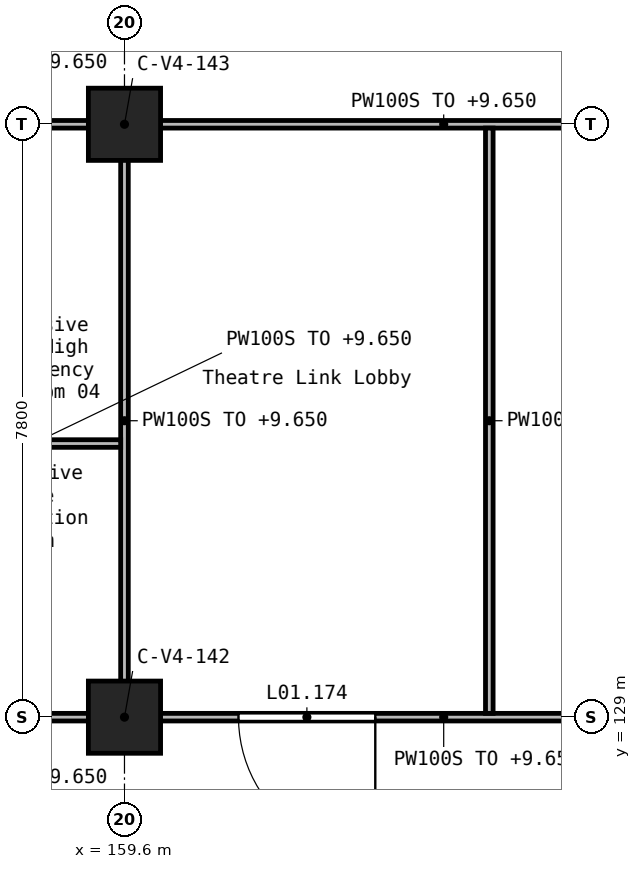
"""IFC4 building model, lengths in metres.
Left out: names, types, materials, properties, quantities, classifications, styles, units other than length and angle.
Written with IfcOpenShell. Run it as: python <this file> out.ifc"""

import sys

from ifc_helpers import new_model, si_unit, direction, frame, frame_2d, origin, origin_2d, place, context, subcontext, project, spatial, rectangle, extrude, element, fill, save


model = new_model("IFC4")
c1 = context("Model", 3, precision=1e-05, world=origin(), true_north=direction((0.0, 1.0)))
c2 = subcontext(c1, "Body", "Model", "MODEL_VIEW")
j1 = project(units=[si_unit("LENGTHUNIT", "METRE"), si_unit("PLANEANGLEUNIT", "RADIAN")], contexts=[c1])
p1 = place(None, origin())
s1 = spatial("IfcSite", under=j1, at=p1, CompositionType="ELEMENT")
p2 = place(p1, origin())
s2 = spatial("IfcBuilding", under=s1, at=p2, CompositionType="ELEMENT")
p3 = place(p2, frame((0.0, 0.0, 5.4)))
s3 = spatial("IfcBuildingStorey", under=s2, at=p3, CompositionType="ELEMENT", Elevation=5.4)
for number, where, z_axis, x_axis in (
    (1, (159.6, 129.0, 0.0), (0.0, 0.0, 1.0), (1.0, 0.0, 0.0)),
    (2, (159.6, 136.8, 0.0), (0.0, 0.0, 1.0), (1.0, 0.0, 0.0)),
):
    element("IfcColumn", number, at=place(p3, frame(where, z_axis=z_axis, x_axis=x_axis)), inside=s3, PredefinedType="COLUMN", context=c2, shape_type="SweptSolid", body=[
        extrude(rectangle(XDim=0.95, YDim=0.95, at=origin_2d()), origin(), (0.0, 0.0, 1.0), 4.5),
    ])
p4 = place(p3, frame((167.55, 129.0, 0.0), z_axis=(0.0, 0.0, 1.0), x_axis=(-1.0, 0.0, 0.0)))
e3 = element("IfcWall", 3, at=p4, inside=s3, PredefinedType="PARTITIONING", context=c2, shape_type="SweptSolid", body=[
    extrude(rectangle(XDim=7.5, YDim=0.1, at=frame_2d((3.75, 0.0))), origin(), (0.0, 0.0, 1.0), 4.25),
])
p5 = place(p4, frame((4.65, 0.0, 0.0)))
e4 = element("IfcOpeningElement", 4, at=p5, cuts=e3, PredefinedType="OPENING", context=c2, shape_type="SweptSolid", body=[
    extrude(rectangle(XDim=1.8, YDim=2.1, at=frame_2d((0.9, 1.05))), frame((0.0, 0.06, 0.0), z_axis=(0.0, -1.0, 0.0), x_axis=(1.0, 0.0, 0.0)), (0.0, 0.0, 1.0), 0.12),
])
p6 = place(p3, frame((159.15, 129.0, 0.0), z_axis=(0.0, 0.0, 1.0), x_axis=(-1.0, 0.0, 0.0)))
e5 = element("IfcWall", 5, at=p6, inside=s3, PredefinedType="PARTITIONING", context=c2, shape_type="SweptSolid", body=[
    extrude(rectangle(XDim=2.0, YDim=0.1, at=frame_2d((1.0, 0.0))), origin(), (0.0, 0.0, 1.0), 4.25),
])
p7 = place(p3, frame((167.55, 136.8, 0.0), z_axis=(0.0, 0.0, 1.0), x_axis=(-1.0, 0.0, 0.0)))
e6 = element("IfcWall", 6, at=p7, inside=s3, PredefinedType="PARTITIONING", context=c2, shape_type="SweptSolid", body=[
    extrude(rectangle(XDim=7.5, YDim=0.1, at=frame_2d((3.75, 0.0))), origin(), (0.0, 0.0, 1.0), 4.25),
])
p8 = place(p3, frame((159.15, 136.8, 0.0), z_axis=(0.0, 0.0, 1.0), x_axis=(-1.0, 0.0, 0.0)))
e7 = element("IfcWall", 7, at=p8, inside=s3, PredefinedType="PARTITIONING", context=c2, shape_type="SweptSolid", body=[
    extrude(rectangle(XDim=2.0, YDim=0.1, at=frame_2d((1.0, 0.0))), origin(), (0.0, 0.0, 1.0), 4.25),
])
p9 = place(p3, frame((159.6, 129.45, 0.0), z_axis=(0.0, 0.0, 1.0), x_axis=(0.0, 1.0, 0.0)))
e8 = element("IfcWall", 8, at=p9, inside=s3, PredefinedType="PARTITIONING", context=c2, shape_type="SweptSolid", body=[
    extrude(rectangle(XDim=6.9, YDim=0.1, at=frame_2d((3.45, 0.0))), origin(), (0.0, 0.0, 1.0), 4.25),
])
p10 = place(p3, frame((164.4, 129.05, 0.0), z_axis=(0.0, 0.0, 1.0), x_axis=(0.0, 1.0, 0.0)))
e9 = element("IfcWall", 9, at=p10, inside=s3, PredefinedType="PARTITIONING", context=c2, shape_type="SweptSolid", body=[
    extrude(rectangle(XDim=7.7, YDim=0.1, at=frame_2d((3.85, 0.0))), origin(), (0.0, 0.0, 1.0), 4.25),
])
p11 = place(p3, frame((157.25, 132.6, 0.0), z_axis=(0.0, 0.0, 1.0), x_axis=(1.0, 0.0, 0.0)))
e10 = element("IfcWall", 10, at=p11, inside=s3, PredefinedType="PARTITIONING", context=c2, shape_type="SweptSolid", body=[
    extrude(rectangle(XDim=2.3, YDim=0.1, at=frame_2d((1.15, 0.0))), origin(), (0.0, 0.0, 1.0), 4.25),
])
p12 = place(p5, frame((1.8, 0.0, 0.0), z_axis=(0.0, 0.0, 1.0), x_axis=(-1.0, 0.0, 0.0)))
e11 = element("IfcDoor", 11, at=p12, inside=s3, OperationType="DOUBLE_DOOR_SINGLE_SWING", PredefinedType="DOOR", context=c2, shape_type="SweptSolid", body=[
    extrude(rectangle(XDim=1.8, YDim=2.1, at=frame_2d((0.9, 1.05))), frame((0.0, 0.025, 0.0), z_axis=(0.0, -1.0, 0.0), x_axis=(1.0, 0.0, 0.0)), (0.0, 0.0, 1.0), 0.05),
])
fill(e4, e11)
save(model, sys.argv[1])
